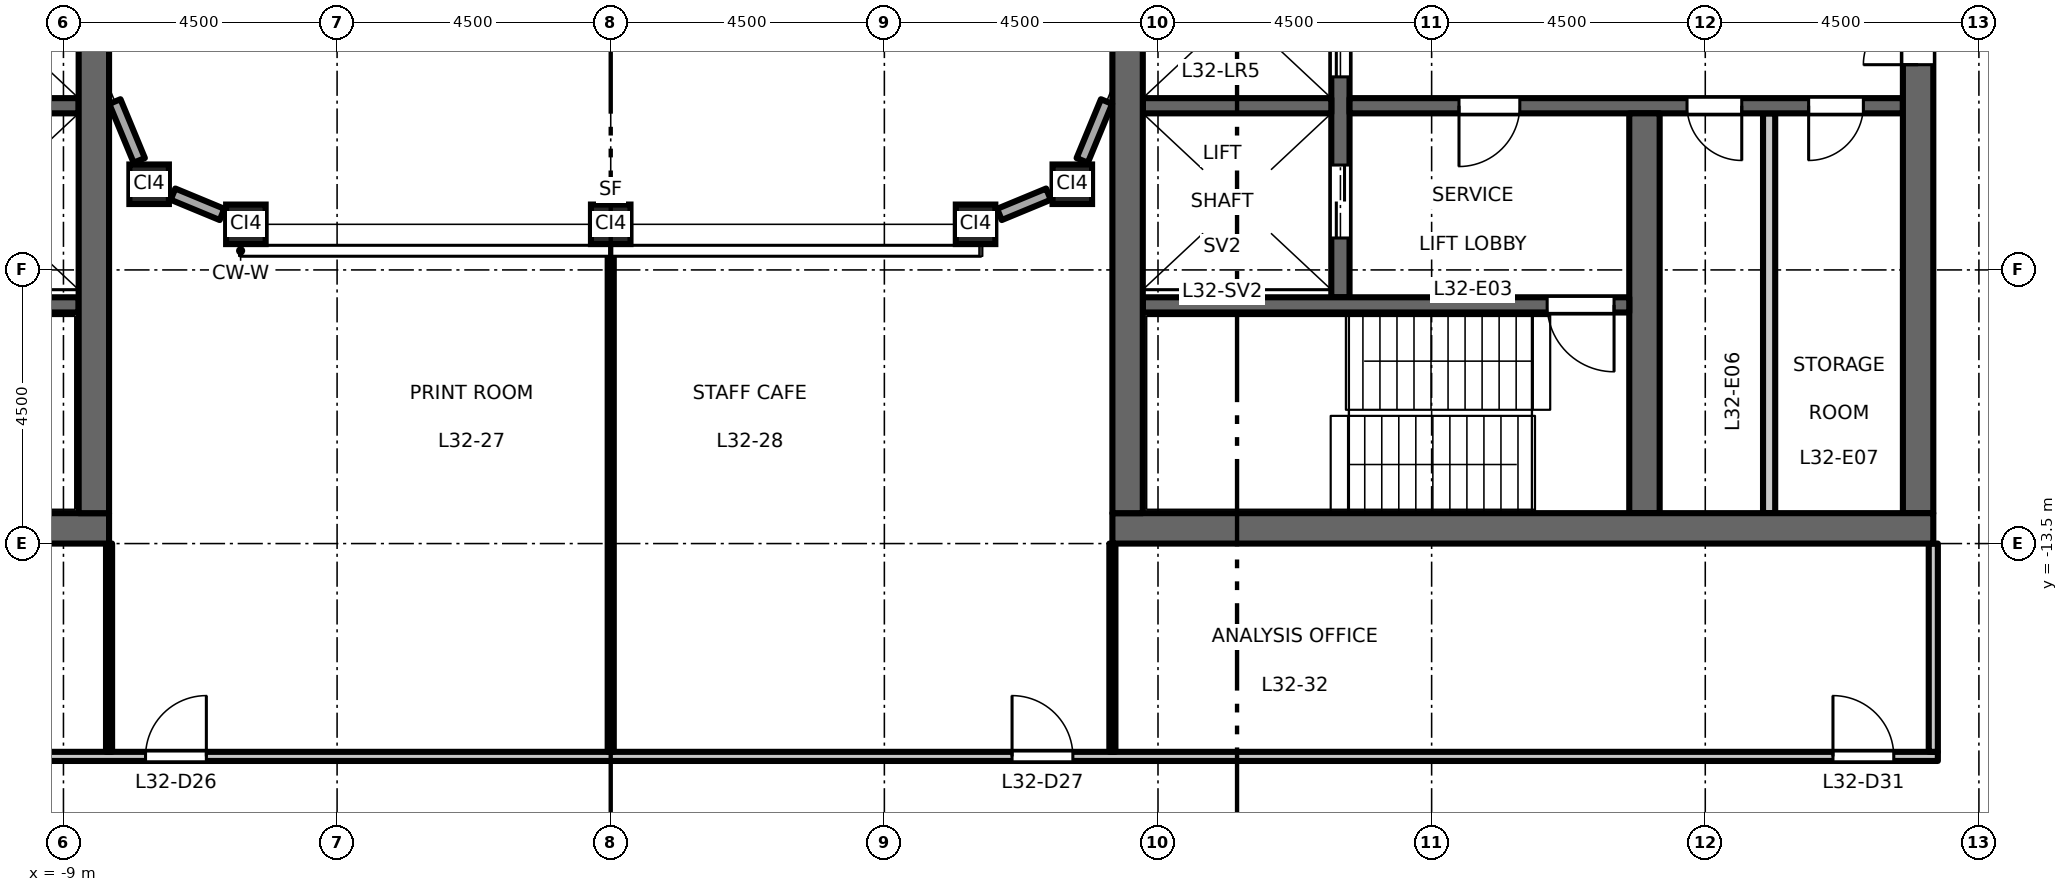
"""IFC4 building model, lengths in metres.
Left out: names, types, materials, properties, quantities, classifications, styles, units other than length and angle.
Written with IfcOpenShell. Run it as: python <this file> out.ifc"""

import sys

from ifc_helpers import new_model, si_unit, direction, frame, frame_2d, origin, origin_2d, place, context, subcontext, project, spatial, rectangle, hollow_rectangle, extrude, element, fill, save


model = new_model("IFC4")
c1 = context("Model", 3, precision=1e-05, world=origin(), true_north=direction((0.0, 1.0)))
c2 = subcontext(c1, "Body", "Model", "MODEL_VIEW")
j1 = project(units=[si_unit("LENGTHUNIT", "METRE"), si_unit("PLANEANGLEUNIT", "RADIAN")], contexts=[c1])
p1 = place(None, origin())
s1 = spatial("IfcSite", under=j1, at=p1, CompositionType="ELEMENT")
p2 = place(p1, origin())
s2 = spatial("IfcBuilding", under=s1, at=p2, CompositionType="ELEMENT")
p3 = place(p2, frame((0.0, 0.0, 149.7)))
s3 = spatial("IfcBuildingStorey", under=s2, at=p3, CompositionType="ELEMENT", Elevation=149.7)
for number, where, z_axis, x_axis in (
    (1, (-7.591, -7.591, 0.0), (0.0, 0.0, 1.0), (1.0, 0.0, 0.0)),
    (2, (-6.0, -8.25, 0.0), (0.0, 0.0, 1.0), (1.0, 0.0, 0.0)),
    (3, (0.0, -8.25, 0.0), (0.0, 0.0, 1.0), (1.0, 0.0, 0.0)),
    (4, (6.0, -8.25, 0.0), (0.0, 0.0, 1.0), (1.0, 0.0, 0.0)),
    (5, (7.591, -7.591, 0.0), (0.0, 0.0, 1.0), (1.0, 0.0, 0.0)),
):
    element("IfcColumn", number, at=place(p3, frame(where, z_axis=z_axis, x_axis=x_axis)), inside=s3, PredefinedType="COLUMN", context=c2, shape_type="SweptSolid", body=[
        extrude(hollow_rectangle(XDim=0.65, YDim=0.65, WallThickness=0.036, at=origin_2d()), origin(), (0.0, 0.0, 1.0), 4.5),
    ])
p4 = place(p3, frame((-8.75, -6.3, 0.0), z_axis=(0.0, 0.0, 1.0), x_axis=(-1.0, 0.0, 0.0)))
e6 = element("IfcWall", 6, at=p4, inside=s3, PredefinedType="SHEAR", context=c2, shape_type="SweptSolid", body=[
    extrude(rectangle(XDim=3.1, YDim=0.25, at=frame_2d((1.55, 0.0))), origin(), (0.0, 0.0, 1.0), 4.35),
])
p5 = place(p3, frame((-8.75, -9.575, 0.0), z_axis=(0.0, 0.0, 1.0), x_axis=(-1.0, 0.0, 0.0)))
e7 = element("IfcWall", 7, at=p5, inside=s3, PredefinedType="SHEAR", context=c2, shape_type="SweptSolid", body=[
    extrude(rectangle(XDim=8.0, YDim=0.25, at=frame_2d((4.0, 0.0))), origin(), (0.0, 0.0, 1.0), 4.35),
])
p6 = place(p5, frame((6.65, 0.0, 0.0)))
e8 = element("IfcOpeningElement", 8, at=p6, cuts=e7, PredefinedType="OPENING", context=c2, shape_type="SweptSolid", body=[
    extrude(rectangle(XDim=1.1, YDim=2.1, at=frame_2d((0.55, 1.05))), frame((0.0, 0.135, 0.0), z_axis=(0.0, -1.0, 0.0), x_axis=(1.0, 0.0, 0.0)), (0.0, 0.0, 1.0), 0.27),
])
p7 = place(p3, frame((-8.25, -13.25, 0.0), z_axis=(0.0, 0.0, 1.0), x_axis=(-1.0, 0.0, 0.0)))
e9 = element("IfcWall", 9, at=p7, inside=s3, PredefinedType="SHEAR", context=c2, shape_type="SweptSolid", body=[
    extrude(rectangle(XDim=13.5, YDim=0.5, at=frame_2d((6.75, 0.0))), origin(), (0.0, 0.0, 1.0), 4.35),
])
p8 = place(p3, frame((-8.5, -13.0, 0.0), z_axis=(0.0, 0.0, 1.0), x_axis=(0.0, 1.0, 0.0)))
e10 = element("IfcWall", 10, at=p8, inside=s3, PredefinedType="SHEAR", context=c2, shape_type="SweptSolid", body=[
    extrude(rectangle(XDim=26.0, YDim=0.5, at=frame_2d((13.0, 0.0))), origin(), (0.0, 0.0, 1.0), 4.35),
])
p9 = place(p3, frame((12.0, -9.45, 0.0), z_axis=(0.0, 0.0, 1.0), x_axis=(0.0, 1.0, 0.0)))
e11 = element("IfcWall", 11, at=p9, inside=s3, PredefinedType="SHEAR", context=c2, shape_type="SweptSolid", body=[
    extrude(rectangle(XDim=18.9, YDim=0.3, at=frame_2d((9.45, 0.0))), origin(), (0.0, 0.0, 1.0), 4.35),
])
p10 = place(p9, frame((3.625, 0.0, 0.0)))
e12 = element("IfcOpeningElement", 12, at=p10, cuts=e11, PredefinedType="OPENING", context=c2, shape_type="SweptSolid", body=[
    extrude(rectangle(XDim=1.1, YDim=2.1, at=frame_2d((0.55, 1.05))), frame((0.0, 0.16, 0.0), z_axis=(0.0, -1.0, 0.0), x_axis=(1.0, 0.0, 0.0)), (0.0, 0.0, 1.0), 0.32),
])
p11 = place(p9, frame((6.775, 0.0, 0.0)))
e13 = element("IfcOpeningElement", 13, at=p11, cuts=e11, PredefinedType="OPENING", context=c2, shape_type="SweptSolid", body=[
    extrude(rectangle(XDim=1.1, YDim=2.1, at=frame_2d((0.55, 1.05))), frame((0.0, 0.16, 0.0), z_axis=(0.0, -1.0, 0.0), x_axis=(1.0, 0.0, 0.0)), (0.0, 0.0, 1.0), 0.32),
])
p12 = place(p9, frame((9.925, 0.0, 0.0)))
e14 = element("IfcOpeningElement", 14, at=p12, cuts=e11, PredefinedType="OPENING", context=c2, shape_type="SweptSolid", body=[
    extrude(rectangle(XDim=1.1, YDim=2.1, at=frame_2d((0.55, 1.05))), frame((0.0, 0.16, 0.0), z_axis=(0.0, -1.0, 0.0), x_axis=(1.0, 0.0, 0.0)), (0.0, 0.0, 1.0), 0.32),
])
p13 = place(p9, frame((13.075, 0.0, 0.0)))
e15 = element("IfcOpeningElement", 15, at=p13, cuts=e11, PredefinedType="OPENING", context=c2, shape_type="SweptSolid", body=[
    extrude(rectangle(XDim=1.1, YDim=2.1, at=frame_2d((0.55, 1.05))), frame((0.0, 0.16, 0.0), z_axis=(0.0, -1.0, 0.0), x_axis=(1.0, 0.0, 0.0)), (0.0, 0.0, 1.0), 0.32),
])
p14 = place(p9, frame((16.725, 0.0, 0.0)))
e16 = element("IfcOpeningElement", 16, at=p14, cuts=e11, PredefinedType="OPENING", context=c2, shape_type="SweptSolid", body=[
    extrude(rectangle(XDim=1.2, YDim=2.1, at=frame_2d((0.6, 1.05))), frame((0.0, 0.16, 0.0), z_axis=(0.0, -1.0, 0.0), x_axis=(1.0, 0.0, 0.0)), (0.0, 0.0, 1.0), 0.32),
])
p15 = place(p9, frame((0.975, 0.0, 0.0)))
e17 = element("IfcOpeningElement", 17, at=p15, cuts=e11, PredefinedType="OPENING", context=c2, shape_type="SweptSolid", body=[
    extrude(rectangle(XDim=1.2, YDim=2.1, at=frame_2d((0.6, 1.05))), frame((0.0, 0.16, 0.0), z_axis=(0.0, -1.0, 0.0), x_axis=(1.0, 0.0, 0.0)), (0.0, 0.0, 1.0), 0.32),
])
p16 = place(p3, frame((12.15, -6.3, 0.0), z_axis=(0.0, 0.0, 1.0), x_axis=(1.0, 0.0, 0.0)))
e18 = element("IfcWall", 18, at=p16, inside=s3, PredefinedType="SHEAR", context=c2, shape_type="SweptSolid", body=[
    extrude(rectangle(XDim=9.1, YDim=0.25, at=frame_2d((4.55, 0.0))), origin(), (0.0, 0.0, 1.0), 4.35),
])
p17 = place(p16, frame((1.8, 0.0, 0.0)))
e19 = element("IfcOpeningElement", 19, at=p17, cuts=e18, PredefinedType="OPENING", context=c2, shape_type="SweptSolid", body=[
    extrude(rectangle(XDim=1.0, YDim=2.1, at=frame_2d((0.5, 1.05))), frame((0.0, 0.135, 0.0), z_axis=(0.0, -1.0, 0.0), x_axis=(1.0, 0.0, 0.0)), (0.0, 0.0, 1.0), 0.27),
])
p18 = place(p16, frame((5.55, 0.0, 0.0)))
e20 = element("IfcOpeningElement", 20, at=p18, cuts=e18, PredefinedType="OPENING", context=c2, shape_type="SweptSolid", body=[
    extrude(rectangle(XDim=0.9, YDim=2.1, at=frame_2d((0.45, 1.05))), frame((0.0, 0.135, 0.0), z_axis=(0.0, -1.0, 0.0), x_axis=(1.0, 0.0, 0.0)), (0.0, 0.0, 1.0), 0.27),
])
p19 = place(p16, frame((7.55, 0.0, 0.0)))
e21 = element("IfcOpeningElement", 21, at=p19, cuts=e18, PredefinedType="OPENING", context=c2, shape_type="SweptSolid", body=[
    extrude(rectangle(XDim=0.9, YDim=2.1, at=frame_2d((0.45, 1.05))), frame((0.0, 0.135, 0.0), z_axis=(0.0, -1.0, 0.0), x_axis=(1.0, 0.0, 0.0)), (0.0, 0.0, 1.0), 0.27),
])
p20 = place(p3, frame((21.5, -13.0, 0.0), z_axis=(0.0, 0.0, 1.0), x_axis=(0.0, 1.0, 0.0)))
e22 = element("IfcWall", 22, at=p20, inside=s3, PredefinedType="SHEAR", context=c2, shape_type="SweptSolid", body=[
    extrude(rectangle(XDim=26.0, YDim=0.5, at=frame_2d((13.0, 0.0))), origin(), (0.0, 0.0, 1.0), 4.35),
])
p21 = place(p20, frame((16.825, 0.0, 0.0)))
e23 = element("IfcOpeningElement", 23, at=p21, cuts=e22, PredefinedType="OPENING", context=c2, shape_type="SweptSolid", body=[
    extrude(rectangle(XDim=1.8, YDim=2.1, at=frame_2d((0.9, 1.05))), frame((0.0, 0.26, 0.0), z_axis=(0.0, -1.0, 0.0), x_axis=(1.0, 0.0, 0.0)), (0.0, 0.0, 1.0), 0.52),
])
p22 = place(p20, frame((7.375, 0.0, 0.0)))
e24 = element("IfcOpeningElement", 24, at=p22, cuts=e22, PredefinedType="OPENING", context=c2, shape_type="SweptSolid", body=[
    extrude(rectangle(XDim=1.8, YDim=2.1, at=frame_2d((0.9, 1.05))), frame((0.0, 0.26, 0.0), z_axis=(0.0, -1.0, 0.0), x_axis=(1.0, 0.0, 0.0)), (0.0, 0.0, 1.0), 0.52),
])
p23 = place(p20, frame((23.8, 0.0, 0.0)))
e25 = element("IfcOpeningElement", 25, at=p23, cuts=e22, PredefinedType="OPENING", context=c2, shape_type="SweptSolid", body=[
    extrude(rectangle(XDim=0.9, YDim=2.1, at=frame_2d((0.45, 1.05))), frame((0.0, 0.26, 0.0), z_axis=(0.0, -1.0, 0.0), x_axis=(1.0, 0.0, 0.0)), (0.0, 0.0, 1.0), 0.52),
])
p24 = place(p3, frame((19.05, -13.0, 0.0), z_axis=(0.0, 0.0, 1.0), x_axis=(0.0, 1.0, 0.0)))
e26 = element("IfcWall", 26, at=p24, inside=s3, PredefinedType="PARTITIONING", context=c2, shape_type="SweptSolid", body=[
    extrude(rectangle(XDim=6.575, YDim=0.2, at=frame_2d((3.288, 0.0))), origin(), (0.0, 0.0, 1.0), 4.35),
])
p25 = place(p3, frame((17.0, -13.0, 0.0), z_axis=(0.0, 0.0, 1.0), x_axis=(0.0, 1.0, 0.0)))
e27 = element("IfcWall", 27, at=p25, inside=s3, PredefinedType="SHEAR", context=c2, shape_type="SweptSolid", body=[
    extrude(rectangle(XDim=6.575, YDim=0.5, at=frame_2d((3.288, 0.0))), origin(), (0.0, 0.0, 1.0), 4.35),
])
p26 = place(p3, frame((8.75, -6.3, 0.0), z_axis=(0.0, 0.0, 1.0), x_axis=(1.0, 0.0, 0.0)))
e28 = element("IfcWall", 28, at=p26, inside=s3, PredefinedType="SHEAR", context=c2, shape_type="SweptSolid", body=[
    extrude(rectangle(XDim=3.1, YDim=0.25, at=frame_2d((1.55, 0.0))), origin(), (0.0, 0.0, 1.0), 4.35),
])
p27 = place(p3, frame((8.75, -9.575, 0.0), z_axis=(0.0, 0.0, 1.0), x_axis=(1.0, 0.0, 0.0)))
e29 = element("IfcWall", 29, at=p27, inside=s3, PredefinedType="SHEAR", context=c2, shape_type="SweptSolid", body=[
    extrude(rectangle(XDim=8.0, YDim=0.25, at=frame_2d((4.0, 0.0))), origin(), (0.0, 0.0, 1.0), 4.35),
])
p28 = place(p27, frame((6.65, 0.0, 0.0)))
e30 = element("IfcOpeningElement", 30, at=p28, cuts=e29, PredefinedType="OPENING", context=c2, shape_type="SweptSolid", body=[
    extrude(rectangle(XDim=1.1, YDim=2.1, at=frame_2d((0.55, 1.05))), frame((0.0, 0.135, 0.0), z_axis=(0.0, -1.0, 0.0), x_axis=(1.0, 0.0, 0.0)), (0.0, 0.0, 1.0), 0.27),
])
p29 = place(p3, frame((8.25, -13.25, 0.0), z_axis=(0.0, 0.0, 1.0), x_axis=(1.0, 0.0, 0.0)))
e31 = element("IfcWall", 31, at=p29, inside=s3, PredefinedType="SHEAR", context=c2, shape_type="SweptSolid", body=[
    extrude(rectangle(XDim=13.5, YDim=0.5, at=frame_2d((6.75, 0.0))), origin(), (0.0, 0.0, 1.0), 4.35),
])
p30 = place(p3, frame((8.5, -13.0, 0.0), z_axis=(0.0, 0.0, 1.0), x_axis=(0.0, 1.0, 0.0)))
e32 = element("IfcWall", 32, at=p30, inside=s3, PredefinedType="SHEAR", context=c2, shape_type="SweptSolid", body=[
    extrude(rectangle(XDim=26.0, YDim=0.5, at=frame_2d((13.0, 0.0))), origin(), (0.0, 0.0, 1.0), 4.35),
])
p31 = place(p3, frame((6.392, -8.087, 0.0), z_axis=(0.0, 0.0, 1.0), x_axis=(0.923894108428, 0.382648241093, 0.0)))
e33 = element("IfcWall", 33, at=p31, inside=s3, PredefinedType="STANDARD", context=c2, shape_type="SweptSolid", body=[
    extrude(rectangle(XDim=0.873, YDim=0.2, at=frame_2d((0.437, 0.0))), origin(), (0.0, 0.0, 1.0), 3.826),
])
for number, where, z_axis, x_axis in (
    (34, (7.753, -7.199, 0.0), (0.0, 0.0, 1.0), (0.383, 0.924, 0.0)),
    (35, (-8.154, -6.231, 0.0), (0.0, 0.0, 1.0), (0.383, -0.924, 0.0)),
):
    element("IfcWall", number, at=place(p3, frame(where, z_axis=z_axis, x_axis=x_axis)), inside=s3, PredefinedType="STANDARD", context=c2, shape_type="SweptSolid", body=[
        extrude(rectangle(XDim=1.048, YDim=0.2, at=frame_2d((0.524, 0.0))), origin(), (0.0, 0.0, 1.0), 3.826),
    ])
p32 = place(p3, frame((-7.199, -7.753, 0.0), z_axis=(0.0, 0.0, 1.0), x_axis=(0.923894108428, -0.382648241093, 0.0)))
e36 = element("IfcWall", 36, at=p32, inside=s3, PredefinedType="STANDARD", context=c2, shape_type="SweptSolid", body=[
    extrude(rectangle(XDim=0.873, YDim=0.2, at=frame_2d((0.437, 0.0))), origin(), (0.0, 0.0, 1.0), 3.826),
])
p33 = place(p3, frame((-21.825, -17.0, 0.0), z_axis=(0.0, 0.0, 1.0), x_axis=(1.0, 0.0, 0.0)))
e37 = element("IfcWall", 37, at=p33, inside=s3, PredefinedType="PARTITIONING", context=c2, shape_type="SweptSolid", body=[
    extrude(rectangle(XDim=43.65, YDim=0.15, at=frame_2d((21.825, 0.0))), origin(), (0.0, 0.0, 1.0), 4.35),
])
p34 = place(p33, frame((14.175, 0.0, 0.0)))
e38 = element("IfcOpeningElement", 38, at=p34, cuts=e37, PredefinedType="OPENING", context=c2, shape_type="SweptSolid", body=[
    extrude(rectangle(XDim=1.0, YDim=2.1, at=frame_2d((0.5, 1.05))), frame((0.0, 0.085, 0.0), z_axis=(0.0, -1.0, 0.0), x_axis=(1.0, 0.0, 0.0)), (0.0, 0.0, 1.0), 0.17),
])
p35 = place(p33, frame((28.425, 0.0, 0.0)))
e39 = element("IfcOpeningElement", 39, at=p35, cuts=e37, PredefinedType="OPENING", context=c2, shape_type="SweptSolid", body=[
    extrude(rectangle(XDim=1.0, YDim=2.1, at=frame_2d((0.5, 1.05))), frame((0.0, 0.085, 0.0), z_axis=(0.0, -1.0, 0.0), x_axis=(1.0, 0.0, 0.0)), (0.0, 0.0, 1.0), 0.17),
])
p36 = place(p33, frame((0.675, 0.0, 0.0)))
e40 = element("IfcOpeningElement", 40, at=p36, cuts=e37, PredefinedType="OPENING", context=c2, shape_type="SweptSolid", body=[
    extrude(rectangle(XDim=1.0, YDim=2.1, at=frame_2d((0.5, 1.05))), frame((0.0, 0.085, 0.0), z_axis=(0.0, -1.0, 0.0), x_axis=(1.0, 0.0, 0.0)), (0.0, 0.0, 1.0), 0.17),
])
p37 = place(p33, frame((41.925, 0.0, 0.0)))
e41 = element("IfcOpeningElement", 41, at=p37, cuts=e37, PredefinedType="OPENING", context=c2, shape_type="SweptSolid", body=[
    extrude(rectangle(XDim=1.0, YDim=2.1, at=frame_2d((0.5, 1.05))), frame((0.0, 0.085, 0.0), z_axis=(0.0, -1.0, 0.0), x_axis=(1.0, 0.0, 0.0)), (0.0, 0.0, 1.0), 0.17),
])
p38 = place(p3, frame((-8.25, -16.925, 0.0), z_axis=(0.0, 0.0, 1.0), x_axis=(0.0, 1.0, 0.0)))
e42 = element("IfcWall", 42, at=p38, inside=s3, PredefinedType="PARTITIONING", context=c2, shape_type="SweptSolid", body=[
    extrude(rectangle(XDim=3.425, YDim=0.1, at=frame_2d((1.712, 0.0))), origin(), (0.0, 0.0, 1.0), 4.35),
])
p39 = place(p3, frame((0.0, -16.925, 0.0), z_axis=(0.0, 0.0, 1.0), x_axis=(0.0, 1.0, 0.0)))
e43 = element("IfcWall", 43, at=p39, inside=s3, PredefinedType="PARTITIONING", context=c2, shape_type="SweptSolid", body=[
    extrude(rectangle(XDim=8.275, YDim=0.1, at=frame_2d((4.138, 0.0))), origin(), (0.0, 0.0, 1.0), 3.45),
])
p40 = place(p3, frame((8.25, -16.925, 0.0), z_axis=(0.0, 0.0, 1.0), x_axis=(0.0, 1.0, 0.0)))
e44 = element("IfcWall", 44, at=p40, inside=s3, PredefinedType="PARTITIONING", context=c2, shape_type="SweptSolid", body=[
    extrude(rectangle(XDim=3.425, YDim=0.1, at=frame_2d((1.712, 0.0))), origin(), (0.0, 0.0, 1.0), 4.35),
])
p41 = place(p3, frame((21.75, -16.925, 0.0), z_axis=(0.0, 0.0, 1.0), x_axis=(0.0, 1.0, 0.0)))
e45 = element("IfcWall", 45, at=p41, inside=s3, PredefinedType="PARTITIONING", context=c2, shape_type="SweptSolid", body=[
    extrude(rectangle(XDim=3.425, YDim=0.15, at=frame_2d((1.712, 0.0))), origin(), (0.0, 0.0, 1.0), 4.35),
])
p42 = place(p17, origin())
e46 = element("IfcDoor", 46, at=p42, inside=s3, OperationType="SINGLE_SWING_LEFT", PredefinedType="DOOR", context=c2, shape_type="SweptSolid", body=[
    extrude(rectangle(XDim=1.0, YDim=2.1, at=frame_2d((0.5, 1.05))), frame((0.0, 0.025, 0.0), z_axis=(0.0, -1.0, 0.0), x_axis=(1.0, 0.0, 0.0)), (0.0, 0.0, 1.0), 0.05),
])
fill(e19, e46)
p43 = place(p28, origin())
e47 = element("IfcDoor", 47, at=p43, inside=s3, OperationType="SINGLE_SWING_RIGHT", PredefinedType="DOOR", context=c2, shape_type="SweptSolid", body=[
    extrude(rectangle(XDim=1.1, YDim=2.1, at=frame_2d((0.55, 1.05))), frame((0.0, 0.025, 0.0), z_axis=(0.0, -1.0, 0.0), x_axis=(1.0, 0.0, 0.0)), (0.0, 0.0, 1.0), 0.05),
])
fill(e30, e47)
p44 = place(p22, origin())
e48 = element("IfcDoor", 48, at=p44, inside=s3, OperationType="DOUBLE_DOOR_DOUBLE_SWING", PredefinedType="DOOR", context=c2, shape_type="SweptSolid", body=[
    extrude(rectangle(XDim=1.8, YDim=2.1, at=frame_2d((0.9, 1.05))), frame((0.0, 0.025, 0.0), z_axis=(0.0, -1.0, 0.0), x_axis=(1.0, 0.0, 0.0)), (0.0, 0.0, 1.0), 0.05),
])
fill(e24, e48)
p45 = place(p10, origin())
e49 = element("IfcDoor", 49, at=p45, inside=s3, OperationType="DOUBLE_DOOR_SLIDING", PredefinedType="DOOR", context=c2, shape_type="SweptSolid", body=[
    extrude(rectangle(XDim=1.1, YDim=2.1, at=frame_2d((0.55, 1.05))), frame((0.0, 0.025, 0.0), z_axis=(0.0, -1.0, 0.0), x_axis=(1.0, 0.0, 0.0)), (0.0, 0.0, 1.0), 0.05),
])
fill(e12, e49)
p46 = place(p15, origin())
e50 = element("IfcDoor", 50, at=p46, inside=s3, OperationType="DOUBLE_DOOR_SLIDING", PredefinedType="DOOR", context=c2, shape_type="SweptSolid", body=[
    extrude(rectangle(XDim=1.2, YDim=2.1, at=frame_2d((0.6, 1.05))), frame((0.0, 0.025, 0.0), z_axis=(0.0, -1.0, 0.0), x_axis=(1.0, 0.0, 0.0)), (0.0, 0.0, 1.0), 0.05),
])
fill(e17, e50)
p47 = place(p18, origin())
e51 = element("IfcDoor", 51, at=p47, inside=s3, OperationType="SINGLE_SWING_RIGHT", PredefinedType="DOOR", context=c2, shape_type="SweptSolid", body=[
    extrude(rectangle(XDim=0.9, YDim=2.1, at=frame_2d((0.45, 1.05))), frame((0.0, 0.025, 0.0), z_axis=(0.0, -1.0, 0.0), x_axis=(1.0, 0.0, 0.0)), (0.0, 0.0, 1.0), 0.05),
])
fill(e20, e51)
p48 = place(p19, origin())
e52 = element("IfcDoor", 52, at=p48, inside=s3, OperationType="SINGLE_SWING_LEFT", PredefinedType="DOOR", context=c2, shape_type="SweptSolid", body=[
    extrude(rectangle(XDim=0.9, YDim=2.1, at=frame_2d((0.45, 1.05))), frame((0.0, 0.025, 0.0), z_axis=(0.0, -1.0, 0.0), x_axis=(1.0, 0.0, 0.0)), (0.0, 0.0, 1.0), 0.05),
])
fill(e21, e52)
p49 = place(p34, origin())
e53 = element("IfcDoor", 53, at=p49, inside=s3, OperationType="SINGLE_SWING_RIGHT", PredefinedType="DOOR", context=c2, shape_type="SweptSolid", body=[
    extrude(rectangle(XDim=1.0, YDim=2.1, at=frame_2d((0.5, 1.05))), frame((0.0, 0.025, 0.0), z_axis=(0.0, -1.0, 0.0), x_axis=(1.0, 0.0, 0.0)), (0.0, 0.0, 1.0), 0.05),
])
fill(e38, e53)
p50 = place(p35, origin())
e54 = element("IfcDoor", 54, at=p50, inside=s3, OperationType="SINGLE_SWING_LEFT", PredefinedType="DOOR", context=c2, shape_type="SweptSolid", body=[
    extrude(rectangle(XDim=1.0, YDim=2.1, at=frame_2d((0.5, 1.05))), frame((0.0, 0.025, 0.0), z_axis=(0.0, -1.0, 0.0), x_axis=(1.0, 0.0, 0.0)), (0.0, 0.0, 1.0), 0.05),
])
fill(e39, e54)
p51 = place(p37, origin())
e55 = element("IfcDoor", 55, at=p51, inside=s3, OperationType="SINGLE_SWING_LEFT", PredefinedType="DOOR", context=c2, shape_type="SweptSolid", body=[
    extrude(rectangle(XDim=1.0, YDim=2.1, at=frame_2d((0.5, 1.05))), frame((0.0, 0.025, 0.0), z_axis=(0.0, -1.0, 0.0), x_axis=(1.0, 0.0, 0.0)), (0.0, 0.0, 1.0), 0.05),
])
fill(e41, e55)
save(model, sys.argv[1])
